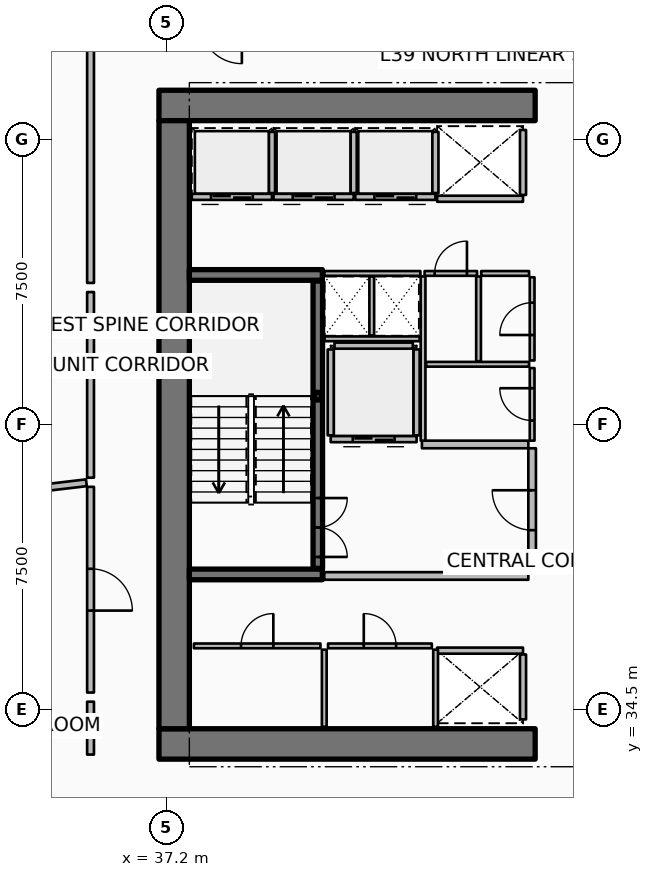
"""IFC4 building model, lengths in metres.
Left out: names, types, materials, properties, quantities, classifications, styles, units other than length and angle.
Written with IfcOpenShell. Run it as: python <this file> out.ifc"""

import sys

from ifc_helpers import new_model, si_unit, direction, frame, frame_2d, origin, origin_2d, place, context, subcontext, project, spatial, rectangle, hollow_rectangle, extrude, element, fill, save


model = new_model("IFC4")
c1 = context("Model", 3, precision=1e-05, world=origin(), true_north=direction((0.0, 1.0)))
c2 = subcontext(c1, "Body", "Model", "MODEL_VIEW")
j1 = project(units=[si_unit("LENGTHUNIT", "METRE"), si_unit("PLANEANGLEUNIT", "RADIAN")], contexts=[c1])
p1 = place(None, origin())
s1 = spatial("IfcSite", under=j1, at=p1, CompositionType="ELEMENT")
p2 = place(p1, origin())
s2 = spatial("IfcBuilding", under=s1, at=p2, CompositionType="ELEMENT")
p3 = place(p2, frame((0.0, 0.0, 157.8)))
s3 = spatial("IfcBuildingStorey", under=s2, at=p3, CompositionType="ELEMENT", Elevation=157.8)
for number, where, z_axis, x_axis in (
    (1, (37.0, 33.6, 0.0), (0.0, 0.0, 1.0), (1.0, 0.0, 0.0)),
    (2, (37.0, 50.4, 0.0), (0.0, 0.0, 1.0), (1.0, 0.0, 0.0)),
):
    element("IfcWall", number, at=place(p3, frame(where, z_axis=z_axis, x_axis=x_axis)), inside=s3, PredefinedType="SHEAR", context=c2, shape_type="SweptSolid", body=[
        extrude(rectangle(XDim=9.9, YDim=0.8, at=frame_2d((4.95, 0.0))), origin(), (0.0, 0.0, 1.0), 3.75),
    ])
p4 = place(p3, frame((37.4, 34.0, 0.0), z_axis=(0.0, 0.0, 1.0), x_axis=(0.0, 1.0, 0.0)))
e3 = element("IfcWall", 3, at=p4, inside=s3, PredefinedType="SHEAR", context=c2, shape_type="SweptSolid", body=[
    extrude(rectangle(XDim=16.0, YDim=0.8, at=frame_2d((8.0, 0.0))), origin(), (0.0, 0.0, 1.0), 3.75),
])
for number, where, z_axis, x_axis in (
    (4, (37.8, 38.06, 0.0), (0.0, 0.0, 1.0), (1.0, 0.0, 0.0)),
    (5, (37.8, 45.94, 0.0), (0.0, 0.0, 1.0), (1.0, 0.0, 0.0)),
):
    element("IfcWall", number, at=place(p3, frame(where, z_axis=z_axis, x_axis=x_axis)), inside=s3, PredefinedType="SHEAR", context=c2, shape_type="SweptSolid", body=[
        extrude(rectangle(XDim=3.5, YDim=0.28, at=frame_2d((1.75, 0.0))), origin(), (0.0, 0.0, 1.0), 3.75),
    ])
p5 = place(p3, frame((41.18, 42.75, 0.0), z_axis=(0.0, 0.0, 1.0), x_axis=(1.0, 0.0, 0.0)))
e6 = element("IfcColumn", 6, at=p5, inside=s3, PredefinedType="COLUMN", context=c2, shape_type="SweptSolid", body=[
    extrude(hollow_rectangle(XDim=0.2, YDim=0.2, WallThickness=0.01, InnerFilletRadius=0.01, OuterFilletRadius=0.02, at=origin_2d()), origin(), (0.0, 0.0, 1.0), 1.67),
])
p6 = place(p3, frame((41.18, 38.22, 0.0), z_axis=(0.0, 0.0, 1.0), x_axis=(0.0, 1.0, 0.0)))
e7 = element("IfcWall", 7, at=p6, inside=s3, PredefinedType="SOLIDWALL", context=c2, shape_type="SweptSolid", body=[
    extrude(rectangle(XDim=7.56, YDim=0.25, at=frame_2d((3.78, 0.0))), origin(), (0.0, 0.0, 1.0), 3.5),
])
p7 = place(p6, frame((0.3, 0.0, 0.0)))
e8 = element("IfcOpeningElement", 8, at=p7, cuts=e7, PredefinedType="OPENING", context=c2, shape_type="SweptSolid", body=[
    extrude(rectangle(XDim=1.55, YDim=2.15, at=frame_2d((0.775, 1.075))), frame((0.0, 0.135, 0.0), z_axis=(0.0, -1.0, 0.0), x_axis=(1.0, 0.0, 0.0)), (0.0, 0.0, 1.0), 0.27),
])
p8 = place(p3, frame((39.975, 47.995, 0.0), z_axis=(0.0, 0.0, 1.0), x_axis=(-1.0, 0.0, 0.0)))
e9 = element("IfcWall", 9, at=p8, inside=s3, PredefinedType="PARTITIONING", context=c2, shape_type="SweptSolid", body=[
    extrude(rectangle(XDim=2.11, YDim=0.16, at=frame_2d((1.055, 0.0))), origin(), (0.0, 0.0, 1.0), 3.5),
])
p9 = place(p8, frame((0.505, 0.0, 0.0)))
e10 = element("IfcOpeningElement", 10, at=p9, cuts=e9, PredefinedType="OPENING", context=c2, shape_type="SweptSolid", body=[
    extrude(rectangle(XDim=1.1, YDim=2.1, at=frame_2d((0.55, 1.05))), frame((0.0, 0.09, 0.0), z_axis=(0.0, -1.0, 0.0), x_axis=(1.0, 0.0, 0.0)), (0.0, 0.0, 1.0), 0.18),
])
p10 = place(p3, frame((39.975, 48.095, 0.0), z_axis=(0.0, 0.0, 1.0), x_axis=(0.0, 1.0, 0.0)))
e11 = element("IfcWall", 11, at=p10, inside=s3, PredefinedType="PARTITIONING", context=c2, shape_type="SweptSolid", body=[
    extrude(rectangle(XDim=1.61, YDim=0.16, at=frame_2d((0.805, 0.0))), origin(), (0.0, 0.0, 1.0), 3.5),
])
p11 = place(p3, frame((42.125, 47.995, 0.0), z_axis=(0.0, 0.0, 1.0), x_axis=(-1.0, 0.0, 0.0)))
e12 = element("IfcWall", 12, at=p11, inside=s3, PredefinedType="PARTITIONING", context=c2, shape_type="SweptSolid", body=[
    extrude(rectangle(XDim=2.11, YDim=0.16, at=frame_2d((1.055, 0.0))), origin(), (0.0, 0.0, 1.0), 3.5),
])
p12 = place(p11, frame((0.505, 0.0, 0.0)))
e13 = element("IfcOpeningElement", 13, at=p12, cuts=e12, PredefinedType="OPENING", context=c2, shape_type="SweptSolid", body=[
    extrude(rectangle(XDim=1.1, YDim=2.1, at=frame_2d((0.55, 1.05))), frame((0.0, 0.09, 0.0), z_axis=(0.0, -1.0, 0.0), x_axis=(1.0, 0.0, 0.0)), (0.0, 0.0, 1.0), 0.18),
])
p13 = place(p3, frame((42.125, 48.095, 0.0), z_axis=(0.0, 0.0, 1.0), x_axis=(0.0, 1.0, 0.0)))
e14 = element("IfcWall", 14, at=p13, inside=s3, PredefinedType="PARTITIONING", context=c2, shape_type="SweptSolid", body=[
    extrude(rectangle(XDim=1.61, YDim=0.16, at=frame_2d((0.805, 0.0))), origin(), (0.0, 0.0, 1.0), 3.5),
])
p14 = place(p3, frame((44.275, 47.995, 0.0), z_axis=(0.0, 0.0, 1.0), x_axis=(-1.0, 0.0, 0.0)))
e15 = element("IfcWall", 15, at=p14, inside=s3, PredefinedType="PARTITIONING", context=c2, shape_type="SweptSolid", body=[
    extrude(rectangle(XDim=2.11, YDim=0.16, at=frame_2d((1.055, 0.0))), origin(), (0.0, 0.0, 1.0), 3.5),
])
p15 = place(p14, frame((0.505, 0.0, 0.0)))
e16 = element("IfcOpeningElement", 16, at=p15, cuts=e15, PredefinedType="OPENING", context=c2, shape_type="SweptSolid", body=[
    extrude(rectangle(XDim=1.1, YDim=2.1, at=frame_2d((0.55, 1.05))), frame((0.0, 0.09, 0.0), z_axis=(0.0, -1.0, 0.0), x_axis=(1.0, 0.0, 0.0)), (0.0, 0.0, 1.0), 0.18),
])
p16 = place(p3, frame((44.275, 48.095, 0.0), z_axis=(0.0, 0.0, 1.0), x_axis=(0.0, 1.0, 0.0)))
e17 = element("IfcWall", 17, at=p16, inside=s3, PredefinedType="PARTITIONING", context=c2, shape_type="SweptSolid", body=[
    extrude(rectangle(XDim=1.61, YDim=0.16, at=frame_2d((0.805, 0.0))), origin(), (0.0, 0.0, 1.0), 3.5),
])
p17 = place(p3, frame((46.58, 47.945, 0.0), z_axis=(0.0, 0.0, 1.0), x_axis=(-1.0, 0.0, 0.0)))
e18 = element("IfcWall", 18, at=p17, inside=s3, PredefinedType="PARTITIONING", context=c2, shape_type="SweptSolid", body=[
    extrude(rectangle(XDim=2.26, YDim=0.16, at=frame_2d((1.13, 0.0))), origin(), (0.0, 0.0, 1.0), 3.5),
])
p18 = place(p3, frame((46.58, 48.045, 0.0), z_axis=(0.0, 0.0, 1.0), x_axis=(0.0, 1.0, 0.0)))
e19 = element("IfcWall", 19, at=p18, inside=s3, PredefinedType="PARTITIONING", context=c2, shape_type="SweptSolid", body=[
    extrude(rectangle(XDim=1.71, YDim=0.16, at=frame_2d((0.855, 0.0))), origin(), (0.0, 0.0, 1.0), 3.5),
])
p19 = place(p3, frame((44.32, 36.055, 0.0), z_axis=(0.0, 0.0, 1.0), x_axis=(1.0, 0.0, 0.0)))
e20 = element("IfcWall", 20, at=p19, inside=s3, PredefinedType="PARTITIONING", context=c2, shape_type="SweptSolid", body=[
    extrude(rectangle(XDim=2.26, YDim=0.16, at=frame_2d((1.13, 0.0))), origin(), (0.0, 0.0, 1.0), 3.5),
])
p20 = place(p3, frame((46.58, 34.245, 0.0), z_axis=(0.0, 0.0, 1.0), x_axis=(0.0, 1.0, 0.0)))
e21 = element("IfcWall", 21, at=p20, inside=s3, PredefinedType="PARTITIONING", context=c2, shape_type="SweptSolid", body=[
    extrude(rectangle(XDim=1.71, YDim=0.16, at=frame_2d((0.855, 0.0))), origin(), (0.0, 0.0, 1.0), 3.5),
])
p21 = place(p3, frame((43.78, 41.62, 0.0), z_axis=(0.0, 0.0, 1.0), x_axis=(-1.0, 0.0, 0.0)))
e22 = element("IfcWall", 22, at=p21, inside=s3, PredefinedType="PARTITIONING", context=c2, shape_type="SweptSolid", body=[
    extrude(rectangle(XDim=2.26, YDim=0.16, at=frame_2d((1.13, 0.0))), origin(), (0.0, 0.0, 1.0), 3.5),
])
p22 = place(p21, frame((0.58, 0.0, 0.0)))
e23 = element("IfcOpeningElement", 23, at=p22, cuts=e22, PredefinedType="OPENING", context=c2, shape_type="SweptSolid", body=[
    extrude(rectangle(XDim=1.1, YDim=2.1, at=frame_2d((0.55, 1.05))), frame((0.0, 0.09, 0.0), z_axis=(0.0, -1.0, 0.0), x_axis=(1.0, 0.0, 0.0)), (0.0, 0.0, 1.0), 0.18),
])
for number, where, z_axis, x_axis in (
    (24, (43.78, 41.72, 0.0), (0.0, 0.0, 1.0), (0.0, 1.0, 0.0)),
    (25, (41.52, 41.72, 0.0), (0.0, 0.0, 1.0), (0.0, 1.0, 0.0)),
):
    element("IfcWall", number, at=place(p3, frame(where, z_axis=z_axis, x_axis=x_axis)), inside=s3, PredefinedType="PARTITIONING", context=c2, shape_type="SweptSolid", body=[
        extrude(rectangle(XDim=2.26, YDim=0.16, at=frame_2d((1.13, 0.0))), origin(), (0.0, 0.0, 1.0), 3.5),
    ])
p23 = place(p3, frame((41.62, 44.08, 0.0), z_axis=(0.0, 0.0, 1.0), x_axis=(1.0, 0.0, 0.0)))
e26 = element("IfcWall", 26, at=p23, inside=s3, PredefinedType="PARTITIONING", context=c2, shape_type="SweptSolid", body=[
    extrude(rectangle(XDim=2.06, YDim=0.16, at=frame_2d((1.03, 0.0))), origin(), (0.0, 0.0, 1.0), 3.5),
])
for number, where, z_axis, x_axis in (
    (27, (44.28, 34.05, 0.0), (0.0, 0.0, 1.0), (0.0, 1.0, 0.0)),
    (28, (41.35, 34.05, 0.0), (0.0, 0.0, 1.0), (0.0, 1.0, 0.0)),
):
    element("IfcWall", number, at=place(p3, frame(where, z_axis=z_axis, x_axis=x_axis)), inside=s3, PredefinedType="PARTITIONING", context=c2, shape_type="SweptSolid", body=[
        extrude(rectangle(XDim=2.03, YDim=0.125, at=frame_2d((1.015, 0.0))), origin(), (0.0, 0.0, 1.0), 2.94),
    ])
p24 = place(p3, frame((37.92, 36.18, 0.0), z_axis=(0.0, 0.0, 1.0), x_axis=(1.0, 0.0, 0.0)))
e29 = element("IfcWall", 29, at=p24, inside=s3, PredefinedType="PARTITIONING", context=c2, shape_type="SweptSolid", body=[
    extrude(rectangle(XDim=3.33, YDim=0.125, at=frame_2d((1.665, 0.0))), origin(), (0.0, 0.0, 1.0), 2.94),
])
p25 = place(p24, frame((1.24, 0.0, 0.0)))
e30 = element("IfcOpeningElement", 30, at=p25, cuts=e29, PredefinedType="OPENING", context=c2, shape_type="SweptSolid", body=[
    extrude(rectangle(XDim=0.85, YDim=2.06, at=frame_2d((0.425, 1.03))), frame((0.0, 0.073, 0.0), z_axis=(0.0, -1.0, 0.0), x_axis=(1.0, 0.0, 0.0)), (0.0, 0.0, 1.0), 0.145),
])
p26 = place(p3, frame((41.45, 36.18, 0.0), z_axis=(0.0, 0.0, 1.0), x_axis=(1.0, 0.0, 0.0)))
e31 = element("IfcWall", 31, at=p26, inside=s3, PredefinedType="PARTITIONING", context=c2, shape_type="SweptSolid", body=[
    extrude(rectangle(XDim=2.73, YDim=0.125, at=frame_2d((1.365, 0.0))), origin(), (0.0, 0.0, 1.0), 2.94),
])
p27 = place(p26, frame((0.94, 0.0, 0.0)))
e32 = element("IfcOpeningElement", 32, at=p27, cuts=e31, PredefinedType="OPENING", context=c2, shape_type="SweptSolid", body=[
    extrude(rectangle(XDim=0.85, YDim=2.06, at=frame_2d((0.425, 1.03))), frame((0.0, 0.073, 0.0), z_axis=(0.0, -1.0, 0.0), x_axis=(1.0, 0.0, 0.0)), (0.0, 0.0, 1.0), 0.145),
])
p28 = place(p3, frame((41.35, 38.02, 0.0), z_axis=(0.0, 0.0, 1.0), x_axis=(1.0, 0.0, 0.0)))
e33 = element("IfcWall", 33, at=p28, inside=s3, PredefinedType="PARTITIONING", context=c2, shape_type="SweptSolid", body=[
    extrude(rectangle(XDim=5.37, YDim=0.2, at=frame_2d((2.685, 0.0))), origin(), (0.0, 0.0, 1.0), 3.5),
])
p29 = place(p3, frame((43.92, 41.48, 0.0), z_axis=(0.0, 0.0, 1.0), x_axis=(1.0, 0.0, 0.0)))
e34 = element("IfcWall", 34, at=p29, inside=s3, PredefinedType="PARTITIONING", context=c2, shape_type="SweptSolid", body=[
    extrude(rectangle(XDim=2.8, YDim=0.2, at=frame_2d((1.4, 0.0))), origin(), (0.0, 0.0, 1.0), 3.5),
])
p30 = place(p3, frame((46.82, 38.12, 0.0), z_axis=(0.0, 0.0, 1.0), x_axis=(0.0, 1.0, 0.0)))
e35 = element("IfcWall", 35, at=p30, inside=s3, PredefinedType="PARTITIONING", context=c2, shape_type="SweptSolid", body=[
    extrude(rectangle(XDim=3.26, YDim=0.2, at=frame_2d((1.63, 0.0))), origin(), (0.0, 0.0, 1.0), 3.5),
])
p31 = place(p30, frame((1.105, 0.0, 0.0)))
e36 = element("IfcOpeningElement", 36, at=p31, cuts=e35, PredefinedType="OPENING", context=c2, shape_type="SweptSolid", body=[
    extrude(rectangle(XDim=1.05, YDim=2.1, at=frame_2d((0.525, 1.05))), frame((0.0, 0.11, 0.0), z_axis=(0.0, -1.0, 0.0), x_axis=(1.0, 0.0, 0.0)), (0.0, 0.0, 1.0), 0.22),
])
p32 = place(p3, frame((41.36, 44.26, 0.0), z_axis=(0.0, 0.0, 1.0), x_axis=(1.0, 0.0, 0.0)))
e37 = element("IfcWall", 37, at=p32, inside=s3, PredefinedType="PARTITIONING", context=c2, shape_type="SweptSolid", body=[
    extrude(rectangle(XDim=2.5, YDim=0.125, at=frame_2d((1.25, 0.0))), origin(), (0.0, 0.0, 1.0), 2.94),
])
p33 = place(p3, frame((42.6, 44.35, 0.0), z_axis=(0.0, 0.0, 1.0), x_axis=(0.0, 1.0, 0.0)))
e38 = element("IfcWall", 38, at=p33, inside=s3, PredefinedType="PARTITIONING", context=c2, shape_type="SweptSolid", body=[
    extrude(rectangle(XDim=1.55, YDim=0.125, at=frame_2d((0.775, 0.0))), origin(), (0.0, 0.0, 1.0), 2.94),
])
p34 = place(p3, frame((43.95, 41.58, 0.0), z_axis=(0.0, 0.0, 1.0), x_axis=(0.0, 1.0, 0.0)))
e39 = element("IfcWall", 39, at=p34, inside=s3, PredefinedType="PARTITIONING", context=c2, shape_type="SweptSolid", body=[
    extrude(rectangle(XDim=4.32, YDim=0.125, at=frame_2d((2.16, 0.0))), origin(), (0.0, 0.0, 1.0), 2.94),
])
p35 = place(p3, frame((44.03, 43.59, 0.0), z_axis=(0.0, 0.0, 1.0), x_axis=(1.0, 0.0, 0.0)))
e40 = element("IfcWall", 40, at=p35, inside=s3, PredefinedType="PARTITIONING", context=c2, shape_type="SweptSolid", body=[
    extrude(rectangle(XDim=2.71, YDim=0.125, at=frame_2d((1.355, 0.0))), origin(), (0.0, 0.0, 1.0), 2.94),
])
p36 = place(p3, frame((45.41, 43.67, 0.0), z_axis=(0.0, 0.0, 1.0), x_axis=(0.0, 1.0, 0.0)))
e41 = element("IfcWall", 41, at=p36, inside=s3, PredefinedType="PARTITIONING", context=c2, shape_type="SweptSolid", body=[
    extrude(rectangle(XDim=2.23, YDim=0.125, at=frame_2d((1.115, 0.0))), origin(), (0.0, 0.0, 1.0), 2.94),
])
p37 = place(p3, frame((46.82, 41.58, 0.0), z_axis=(0.0, 0.0, 1.0), x_axis=(0.0, 1.0, 0.0)))
e42 = element("IfcWall", 42, at=p37, inside=s3, PredefinedType="PARTITIONING", context=c2, shape_type="SweptSolid", body=[
    extrude(rectangle(XDim=1.91, YDim=0.125, at=frame_2d((0.955, 0.0))), origin(), (0.0, 0.0, 1.0), 2.94),
])
p38 = place(p37, frame((0.53, 0.0, 0.0)))
e43 = element("IfcOpeningElement", 43, at=p38, cuts=e42, PredefinedType="OPENING", context=c2, shape_type="SweptSolid", body=[
    extrude(rectangle(XDim=0.85, YDim=2.06, at=frame_2d((0.425, 1.03))), frame((0.0, 0.073, 0.0), z_axis=(0.0, -1.0, 0.0), x_axis=(1.0, 0.0, 0.0)), (0.0, 0.0, 1.0), 0.145),
])
p39 = place(p3, frame((46.82, 43.69, 0.0), z_axis=(0.0, 0.0, 1.0), x_axis=(0.0, 1.0, 0.0)))
e44 = element("IfcWall", 44, at=p39, inside=s3, PredefinedType="PARTITIONING", context=c2, shape_type="SweptSolid", body=[
    extrude(rectangle(XDim=2.19, YDim=0.125, at=frame_2d((1.095, 0.0))), origin(), (0.0, 0.0, 1.0), 2.94),
])
p40 = place(p39, frame((0.67, 0.0, 0.0)))
e45 = element("IfcOpeningElement", 45, at=p40, cuts=e44, PredefinedType="OPENING", context=c2, shape_type="SweptSolid", body=[
    extrude(rectangle(XDim=0.85, YDim=2.06, at=frame_2d((0.425, 1.03))), frame((0.0, 0.073, 0.0), z_axis=(0.0, -1.0, 0.0), x_axis=(1.0, 0.0, 0.0)), (0.0, 0.0, 1.0), 0.145),
])
p41 = place(p3, frame((41.35, 45.98, 0.0), z_axis=(0.0, 0.0, 1.0), x_axis=(1.0, 0.0, 0.0)))
e46 = element("IfcWall", 46, at=p41, inside=s3, PredefinedType="PARTITIONING", context=c2, shape_type="SweptSolid", body=[
    extrude(rectangle(XDim=2.53, YDim=0.125, at=frame_2d((1.265, 0.0))), origin(), (0.0, 0.0, 1.0), 2.94),
])
p42 = place(p3, frame((43.99, 45.98, 0.0), z_axis=(0.0, 0.0, 1.0), x_axis=(1.0, 0.0, 0.0)))
e47 = element("IfcWall", 47, at=p42, inside=s3, PredefinedType="PARTITIONING", context=c2, shape_type="SweptSolid", body=[
    extrude(rectangle(XDim=1.38, YDim=0.125, at=frame_2d((0.69, 0.0))), origin(), (0.0, 0.0, 1.0), 2.94),
])
p43 = place(p42, frame((0.265, 0.0, 0.0)))
e48 = element("IfcOpeningElement", 48, at=p43, cuts=e47, PredefinedType="OPENING", context=c2, shape_type="SweptSolid", body=[
    extrude(rectangle(XDim=0.85, YDim=2.06, at=frame_2d((0.425, 1.03))), frame((0.0, 0.073, 0.0), z_axis=(0.0, -1.0, 0.0), x_axis=(1.0, 0.0, 0.0)), (0.0, 0.0, 1.0), 0.145),
])
p44 = place(p3, frame((45.48, 45.98, 0.0), z_axis=(0.0, 0.0, 1.0), x_axis=(1.0, 0.0, 0.0)))
e49 = element("IfcWall", 49, at=p44, inside=s3, PredefinedType="PARTITIONING", context=c2, shape_type="SweptSolid", body=[
    extrude(rectangle(XDim=1.26, YDim=0.125, at=frame_2d((0.63, 0.0))), origin(), (0.0, 0.0, 1.0), 2.94),
])
p45 = place(p3, frame((35.091, 40.472, 0.0), z_axis=(0.0, 0.0, 1.0), x_axis=(-0.993067434621, -0.11754603479, 0.0)))
e50 = element("IfcWall", 50, at=p45, inside=s3, PredefinedType="PARTITIONING", context=c2, shape_type="SweptSolid", body=[
    extrude(rectangle(XDim=13.787, YDim=0.18, at=frame_2d((6.894, 0.0))), origin(), (0.0, 0.0, 1.0), 2.94),
])
p46 = place(p3, frame((35.2, 51.971, 0.0), z_axis=(0.0, 0.0, 1.0), x_axis=(0.0, -1.0, 0.0)))
e51 = element("IfcWall", 51, at=p46, inside=s3, PredefinedType="PARTITIONING", context=c2, shape_type="SweptSolid", body=[
    extrude(rectangle(XDim=6.241, YDim=0.18, at=frame_2d((3.12, 0.0))), origin(), (0.0, 0.0, 1.0), 2.94),
])
p47 = place(p3, frame((35.2, 45.49, 0.0), z_axis=(0.0, 0.0, 1.0), x_axis=(0.0, -1.0, 0.0)))
e52 = element("IfcWall", 52, at=p47, inside=s3, PredefinedType="PARTITIONING", context=c2, shape_type="SweptSolid", body=[
    extrude(rectangle(XDim=4.885, YDim=0.18, at=frame_2d((2.442, 0.0))), origin(), (0.0, 0.0, 1.0), 2.94),
])
p48 = place(p3, frame((35.2, 40.365, 0.0), z_axis=(0.0, 0.0, 1.0), x_axis=(0.0, -1.0, 0.0)))
e53 = element("IfcWall", 53, at=p48, inside=s3, PredefinedType="PARTITIONING", context=c2, shape_type="SweptSolid", body=[
    extrude(rectangle(XDim=5.413, YDim=0.18, at=frame_2d((2.707, 0.0))), origin(), (0.0, 0.0, 1.0), 2.94),
])
p49 = place(p48, frame((2.156, 0.0, 0.0)))
e54 = element("IfcOpeningElement", 54, at=p49, cuts=e53, PredefinedType="OPENING", context=c2, shape_type="SweptSolid", body=[
    extrude(rectangle(XDim=1.1, YDim=2.1, at=frame_2d((0.55, 1.05))), frame((0.0, 0.1, 0.0), z_axis=(0.0, -1.0, 0.0), x_axis=(1.0, 0.0, 0.0)), (0.0, 0.0, 1.0), 0.2),
])
p50 = place(p3, frame((35.2, 34.712, 0.0), z_axis=(0.0, 0.0, 1.0), x_axis=(0.0, -1.0, 0.0)))
e55 = element("IfcWall", 55, at=p50, inside=s3, PredefinedType="PARTITIONING", context=c2, shape_type="SweptSolid", body=[
    extrude(rectangle(XDim=1.392, YDim=0.18, at=frame_2d((0.696, 0.0))), origin(), (0.0, 0.0, 1.0), 2.94),
])
p51 = place(p7, origin())
e56 = element("IfcDoor", 56, at=p51, inside=s3, OperationType="DOUBLE_DOOR_SINGLE_SWING", PredefinedType="DOOR", context=c2, shape_type="SweptSolid", body=[
    extrude(rectangle(XDim=1.55, YDim=2.15, at=frame_2d((0.775, 1.075))), frame((0.0, 0.025, 0.0), z_axis=(0.0, -1.0, 0.0), x_axis=(1.0, 0.0, 0.0)), (0.0, 0.0, 1.0), 0.05),
])
fill(e8, e56)
p52 = place(p9, origin())
e57 = element("IfcDoor", 57, at=p52, inside=s3, OperationType="DOUBLE_DOOR_SLIDING", PredefinedType="DOOR", context=c2, shape_type="SweptSolid", body=[
    extrude(rectangle(XDim=1.1, YDim=2.1, at=frame_2d((0.55, 1.05))), frame((0.0, 0.025, 0.0), z_axis=(0.0, -1.0, 0.0), x_axis=(1.0, 0.0, 0.0)), (0.0, 0.0, 1.0), 0.05),
])
fill(e10, e57)
p53 = place(p12, origin())
e58 = element("IfcDoor", 58, at=p53, inside=s3, OperationType="DOUBLE_DOOR_SLIDING", PredefinedType="DOOR", context=c2, shape_type="SweptSolid", body=[
    extrude(rectangle(XDim=1.1, YDim=2.1, at=frame_2d((0.55, 1.05))), frame((0.0, 0.025, 0.0), z_axis=(0.0, -1.0, 0.0), x_axis=(1.0, 0.0, 0.0)), (0.0, 0.0, 1.0), 0.05),
])
fill(e13, e58)
p54 = place(p15, origin())
e59 = element("IfcDoor", 59, at=p54, inside=s3, OperationType="DOUBLE_DOOR_SLIDING", PredefinedType="DOOR", context=c2, shape_type="SweptSolid", body=[
    extrude(rectangle(XDim=1.1, YDim=2.1, at=frame_2d((0.55, 1.05))), frame((0.0, 0.025, 0.0), z_axis=(0.0, -1.0, 0.0), x_axis=(1.0, 0.0, 0.0)), (0.0, 0.0, 1.0), 0.05),
])
fill(e16, e59)
p55 = place(p22, origin())
e60 = element("IfcDoor", 60, at=p55, inside=s3, OperationType="DOUBLE_DOOR_SLIDING", PredefinedType="DOOR", context=c2, shape_type="SweptSolid", body=[
    extrude(rectangle(XDim=1.1, YDim=2.1, at=frame_2d((0.55, 1.05))), frame((0.0, 0.025, 0.0), z_axis=(0.0, -1.0, 0.0), x_axis=(1.0, 0.0, 0.0)), (0.0, 0.0, 1.0), 0.05),
])
fill(e23, e60)
p56 = place(p25, origin())
e61 = element("IfcDoor", 61, at=p56, inside=s3, OperationType="SINGLE_SWING_RIGHT", PredefinedType="DOOR", context=c2, shape_type="SweptSolid", body=[
    extrude(rectangle(XDim=0.85, YDim=2.06, at=frame_2d((0.425, 1.03))), frame((0.0, 0.025, 0.0), z_axis=(0.0, -1.0, 0.0), x_axis=(1.0, 0.0, 0.0)), (0.0, 0.0, 1.0), 0.05),
])
fill(e30, e61)
p57 = place(p27, origin())
e62 = element("IfcDoor", 62, at=p57, inside=s3, OperationType="SINGLE_SWING_LEFT", PredefinedType="DOOR", context=c2, shape_type="SweptSolid", body=[
    extrude(rectangle(XDim=0.85, YDim=2.06, at=frame_2d((0.425, 1.03))), frame((0.0, 0.025, 0.0), z_axis=(0.0, -1.0, 0.0), x_axis=(1.0, 0.0, 0.0)), (0.0, 0.0, 1.0), 0.05),
])
fill(e32, e62)
p58 = place(p31, origin())
e63 = element("IfcDoor", 63, at=p58, inside=s3, OperationType="SINGLE_SWING_RIGHT", PredefinedType="DOOR", context=c2, shape_type="SweptSolid", body=[
    extrude(rectangle(XDim=1.05, YDim=2.1, at=frame_2d((0.525, 1.05))), frame((0.0, 0.025, 0.0), z_axis=(0.0, -1.0, 0.0), x_axis=(1.0, 0.0, 0.0)), (0.0, 0.0, 1.0), 0.05),
])
fill(e36, e63)
p59 = place(p38, origin())
e64 = element("IfcDoor", 64, at=p59, inside=s3, OperationType="SINGLE_SWING_RIGHT", PredefinedType="DOOR", context=c2, shape_type="SweptSolid", body=[
    extrude(rectangle(XDim=0.85, YDim=2.06, at=frame_2d((0.425, 1.03))), frame((0.0, 0.025, 0.0), z_axis=(0.0, -1.0, 0.0), x_axis=(1.0, 0.0, 0.0)), (0.0, 0.0, 1.0), 0.05),
])
fill(e43, e64)
p60 = place(p40, origin())
e65 = element("IfcDoor", 65, at=p60, inside=s3, OperationType="SINGLE_SWING_LEFT", PredefinedType="DOOR", context=c2, shape_type="SweptSolid", body=[
    extrude(rectangle(XDim=0.85, YDim=2.06, at=frame_2d((0.425, 1.03))), frame((0.0, 0.025, 0.0), z_axis=(0.0, -1.0, 0.0), x_axis=(1.0, 0.0, 0.0)), (0.0, 0.0, 1.0), 0.05),
])
fill(e45, e65)
p61 = place(p43, origin())
e66 = element("IfcDoor", 66, at=p61, inside=s3, OperationType="SINGLE_SWING_RIGHT", PredefinedType="DOOR", context=c2, shape_type="SweptSolid", body=[
    extrude(rectangle(XDim=0.85, YDim=2.06, at=frame_2d((0.425, 1.03))), frame((0.0, 0.025, 0.0), z_axis=(0.0, -1.0, 0.0), x_axis=(1.0, 0.0, 0.0)), (0.0, 0.0, 1.0), 0.05),
])
fill(e48, e66)
p62 = place(p49, origin())
e67 = element("IfcDoor", 67, at=p62, inside=s3, OperationType="SINGLE_SWING_RIGHT", PredefinedType="DOOR", context=c2, shape_type="SweptSolid", body=[
    extrude(rectangle(XDim=1.1, YDim=2.1, at=frame_2d((0.55, 1.05))), frame((0.0, 0.025, 0.0), z_axis=(0.0, -1.0, 0.0), x_axis=(1.0, 0.0, 0.0)), (0.0, 0.0, 1.0), 0.05),
])
fill(e54, e67)
save(model, sys.argv[1])
